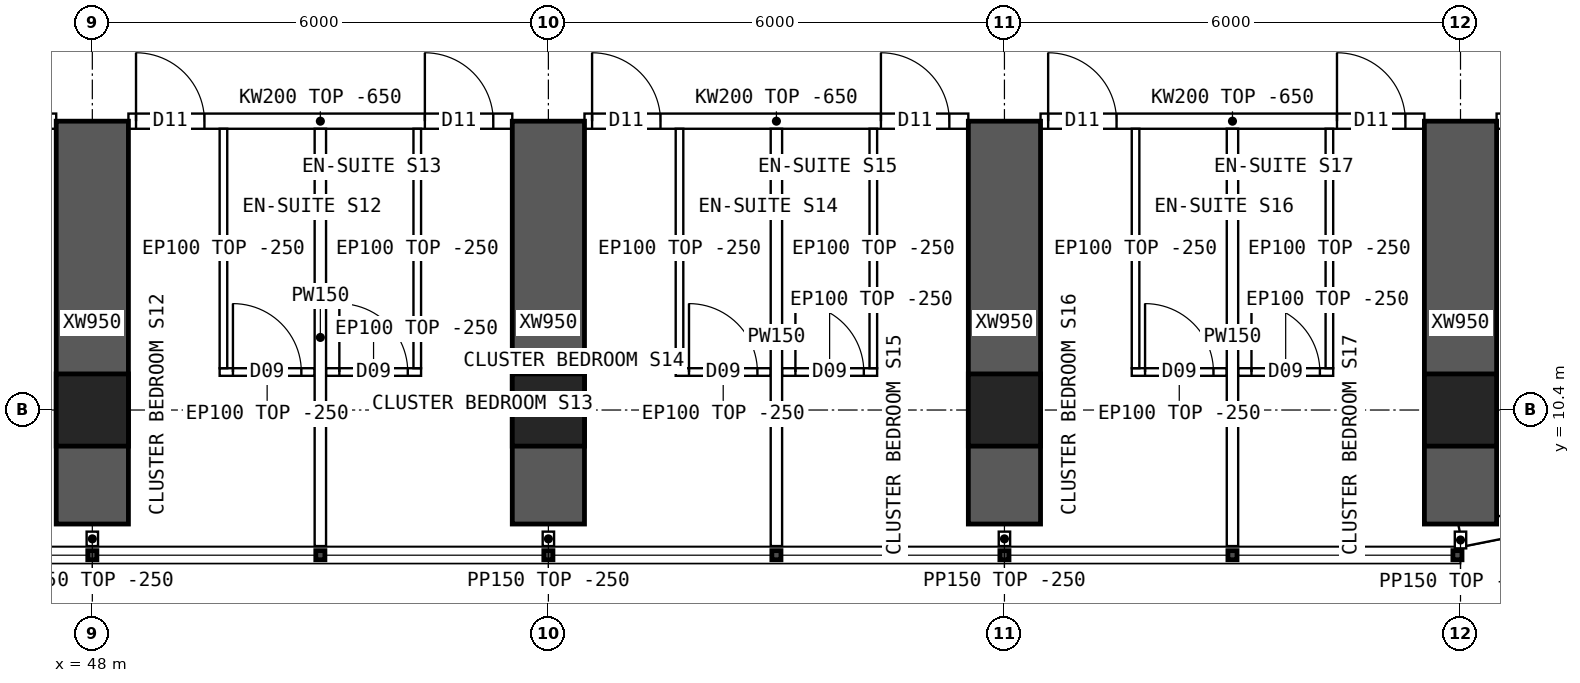
"""IFC4 building model, lengths in metres.
Left out: names, types, materials, properties, quantities, classifications, styles, units other than length and angle.
Written with IfcOpenShell. Run it as: python <this file> out.ifc"""

import sys

from ifc_helpers import new_model, si_unit, direction, frame, frame_2d, origin, origin_2d, place, context, subcontext, project, spatial, polyline, rectangle, hollow_rectangle, outline, extrude, element, fill, save


model = new_model("IFC4")
c1 = context("Model", 3, precision=1e-05, world=origin(), true_north=direction((0.0, 1.0)))
c2 = subcontext(c1, "Body", "Model", "MODEL_VIEW")
j1 = project(units=[si_unit("LENGTHUNIT", "METRE"), si_unit("PLANEANGLEUNIT", "RADIAN")], contexts=[c1])
p1 = place(None, origin())
s1 = spatial("IfcSite", under=j1, at=p1, CompositionType="ELEMENT")
p2 = place(p1, origin())
s2 = spatial("IfcBuilding", under=s1, at=p2, CompositionType="ELEMENT")
p3 = place(p2, frame((0.0, 0.0, 118.15)))
s3 = spatial("IfcBuildingStorey", under=s2, at=p3, CompositionType="ELEMENT", Elevation=118.15)
for number, where, z_axis, x_axis in (
    (1, (48.0, 10.4, 0.0), (0.0, 0.0, 1.0), (1.0, 0.0, 0.0)),
    (2, (54.0, 10.4, 0.0), (0.0, 0.0, 1.0), (1.0, 0.0, 0.0)),
    (3, (60.0, 10.4, 0.0), (0.0, 0.0, 1.0), (1.0, 0.0, 0.0)),
    (4, (66.0, 10.4, 0.0), (0.0, 0.0, 1.0), (1.0, 0.0, 0.0)),
):
    element("IfcColumn", number, at=place(p3, frame(where, z_axis=z_axis, x_axis=x_axis)), inside=s3, PredefinedType="COLUMN", context=c2, shape_type="SweptSolid", body=[
        extrude(hollow_rectangle(XDim=0.95, YDim=0.95, WallThickness=0.095, at=origin_2d()), origin(), (0.0, 0.0, 1.0), 3.75),
    ])
for number, where, z_axis, x_axis in (
    (5, (48.0, 8.9, 0.0), (0.0, 0.0, 1.0), (0.0, 1.0, 0.0)),
    (6, (54.0, 8.9, 0.0), (0.0, 0.0, 1.0), (0.0, 1.0, 0.0)),
    (7, (60.0, 8.9, 0.0), (0.0, 0.0, 1.0), (0.0, 1.0, 0.0)),
    (8, (66.0, 8.9, 0.0), (0.0, 0.0, 1.0), (0.0, 1.0, 0.0)),
):
    element("IfcWall", number, at=place(p3, frame(where, z_axis=z_axis, x_axis=x_axis)), inside=s3, PredefinedType="SHEAR", context=c2, shape_type="SweptSolid", body=[
        extrude(rectangle(XDim=5.3, YDim=0.95, at=frame_2d((2.65, 0.0))), origin(), (0.0, 0.0, 1.0), 3.75),
    ])
p4 = place(p3, frame((66.0, 8.75, 0.0), z_axis=(0.0, 0.0, 1.0), x_axis=(0.980791473772, 0.195059183267, 0.0)))
e9 = element("IfcWall", 9, at=p4, inside=s3, PredefinedType="SOLIDWALL", context=c2, shape_type="SweptSolid", body=[
    extrude(outline(polyline([(-0.03, -0.15), (3.717, -0.15), (3.657, 0.15), (0.03, 0.15), (-0.03, -0.15)])), origin(), (0.0, 0.0, 1.0), 3.5),
])
p5 = place(p4, frame((1.144, 0.0, 0.9)))
e10 = element("IfcOpeningElement", 10, at=p5, cuts=e9, PredefinedType="OPENING", context=c2, shape_type="SweptSolid", body=[
    extrude(rectangle(XDim=1.4, YDim=1.8, at=frame_2d((0.7, 0.9))), frame((0.0, 0.16, 0.0), z_axis=(0.0, -1.0, 0.0), x_axis=(1.0, 0.0, 0.0)), (0.0, 0.0, 1.0), 0.32),
])
p6 = place(p3, frame((42.475, 14.2, 0.0), z_axis=(0.0, 0.0, 1.0), x_axis=(1.0, 0.0, 0.0)))
e11 = element("IfcWall", 11, at=p6, inside=s3, PredefinedType="SOLIDWALL", context=c2, shape_type="SweptSolid", body=[
    extrude(outline(polyline([(0.0, 0.0), (5.05, 0.0), (5.05, 3.1), (0.0, 3.1), (0.0, 0.0)])), frame((0.0, 0.1, 0.0), z_axis=(0.0, -1.0, 0.0), x_axis=(1.0, 0.0, 0.0)), (0.0, 0.0, 1.0), 0.2),
])
p7 = place(p6, frame((0.6, 0.0, 0.0)))
e12 = element("IfcOpeningElement", 12, at=p7, cuts=e11, PredefinedType="OPENING", context=c2, shape_type="SweptSolid", body=[
    extrude(rectangle(XDim=1.0, YDim=2.1, at=frame_2d((0.5, 1.05))), frame((0.0, 0.11, 0.0), z_axis=(0.0, -1.0, 0.0), x_axis=(1.0, 0.0, 0.0)), (0.0, 0.0, 1.0), 0.22),
])
p8 = place(p3, frame((48.475, 14.2, 0.0), z_axis=(0.0, 0.0, 1.0), x_axis=(1.0, 0.0, 0.0)))
e13 = element("IfcWall", 13, at=p8, inside=s3, PredefinedType="SOLIDWALL", context=c2, shape_type="SweptSolid", body=[
    extrude(outline(polyline([(0.0, 0.0), (5.05, 0.0), (5.05, 3.1), (0.0, 3.1), (0.0, 0.0)])), frame((0.0, 0.1, 0.0), z_axis=(0.0, -1.0, 0.0), x_axis=(1.0, 0.0, 0.0)), (0.0, 0.0, 1.0), 0.2),
])
p9 = place(p8, frame((0.1, 0.0, 0.0)))
e14 = element("IfcOpeningElement", 14, at=p9, cuts=e13, PredefinedType="OPENING", context=c2, shape_type="SweptSolid", body=[
    extrude(rectangle(XDim=0.9, YDim=2.1, at=frame_2d((0.45, 1.05))), frame((0.0, 0.11, 0.0), z_axis=(0.0, -1.0, 0.0), x_axis=(1.0, 0.0, 0.0)), (0.0, 0.0, 1.0), 0.22),
])
p10 = place(p8, frame((3.9, 0.0, 0.0)))
e15 = element("IfcOpeningElement", 15, at=p10, cuts=e13, PredefinedType="OPENING", context=c2, shape_type="SweptSolid", body=[
    extrude(rectangle(XDim=0.9, YDim=2.1, at=frame_2d((0.45, 1.05))), frame((0.0, 0.11, 0.0), z_axis=(0.0, -1.0, 0.0), x_axis=(1.0, 0.0, 0.0)), (0.0, 0.0, 1.0), 0.22),
])
p11 = place(p3, frame((54.475, 14.2, 0.0), z_axis=(0.0, 0.0, 1.0), x_axis=(1.0, 0.0, 0.0)))
e16 = element("IfcWall", 16, at=p11, inside=s3, PredefinedType="SOLIDWALL", context=c2, shape_type="SweptSolid", body=[
    extrude(outline(polyline([(0.0, 0.0), (5.05, 0.0), (5.05, 3.1), (0.0, 3.1), (0.0, 0.0)])), frame((0.0, 0.1, 0.0), z_axis=(0.0, -1.0, 0.0), x_axis=(1.0, 0.0, 0.0)), (0.0, 0.0, 1.0), 0.2),
])
p12 = place(p11, frame((0.1, 0.0, 0.0)))
e17 = element("IfcOpeningElement", 17, at=p12, cuts=e16, PredefinedType="OPENING", context=c2, shape_type="SweptSolid", body=[
    extrude(rectangle(XDim=0.9, YDim=2.1, at=frame_2d((0.45, 1.05))), frame((0.0, 0.11, 0.0), z_axis=(0.0, -1.0, 0.0), x_axis=(1.0, 0.0, 0.0)), (0.0, 0.0, 1.0), 0.22),
])
p13 = place(p11, frame((3.9, 0.0, 0.0)))
e18 = element("IfcOpeningElement", 18, at=p13, cuts=e16, PredefinedType="OPENING", context=c2, shape_type="SweptSolid", body=[
    extrude(rectangle(XDim=0.9, YDim=2.1, at=frame_2d((0.45, 1.05))), frame((0.0, 0.11, 0.0), z_axis=(0.0, -1.0, 0.0), x_axis=(1.0, 0.0, 0.0)), (0.0, 0.0, 1.0), 0.22),
])
p14 = place(p3, frame((60.475, 14.2, 0.0), z_axis=(0.0, 0.0, 1.0), x_axis=(1.0, 0.0, 0.0)))
e19 = element("IfcWall", 19, at=p14, inside=s3, PredefinedType="SOLIDWALL", context=c2, shape_type="SweptSolid", body=[
    extrude(outline(polyline([(0.0, 0.0), (5.05, 0.0), (5.05, 3.1), (0.0, 3.1), (0.0, 0.0)])), frame((0.0, 0.1, 0.0), z_axis=(0.0, -1.0, 0.0), x_axis=(1.0, 0.0, 0.0)), (0.0, 0.0, 1.0), 0.2),
])
p15 = place(p14, frame((0.1, 0.0, 0.0)))
e20 = element("IfcOpeningElement", 20, at=p15, cuts=e19, PredefinedType="OPENING", context=c2, shape_type="SweptSolid", body=[
    extrude(rectangle(XDim=0.9, YDim=2.1, at=frame_2d((0.45, 1.05))), frame((0.0, 0.11, 0.0), z_axis=(0.0, -1.0, 0.0), x_axis=(1.0, 0.0, 0.0)), (0.0, 0.0, 1.0), 0.22),
])
p16 = place(p14, frame((3.9, 0.0, 0.0)))
e21 = element("IfcOpeningElement", 21, at=p16, cuts=e19, PredefinedType="OPENING", context=c2, shape_type="SweptSolid", body=[
    extrude(rectangle(XDim=0.9, YDim=2.1, at=frame_2d((0.45, 1.05))), frame((0.0, 0.11, 0.0), z_axis=(0.0, -1.0, 0.0), x_axis=(1.0, 0.0, 0.0)), (0.0, 0.0, 1.0), 0.22),
])
p17 = place(p3, frame((66.475, 14.2, 0.0), z_axis=(0.0, 0.0, 1.0), x_axis=(1.0, 0.0, 0.0)))
e22 = element("IfcWall", 22, at=p17, inside=s3, PredefinedType="SOLIDWALL", context=c2, shape_type="SweptSolid", body=[
    extrude(rectangle(XDim=1.925, YDim=0.2, at=frame_2d((0.962, 0.0))), origin(), (0.0, 0.0, 1.0), 3.5),
])
p18 = place(p17, frame((0.2, 0.0, 0.0)))
e23 = element("IfcOpeningElement", 23, at=p18, cuts=e22, PredefinedType="OPENING", context=c2, shape_type="SweptSolid", body=[
    extrude(rectangle(XDim=0.9, YDim=2.1, at=frame_2d((0.45, 1.05))), frame((0.0, 0.11, 0.0), z_axis=(0.0, -1.0, 0.0), x_axis=(1.0, 0.0, 0.0)), (0.0, 0.0, 1.0), 0.22),
])
p19 = place(p3, frame((51.0, 8.61, 0.0), z_axis=(0.0, 0.0, 1.0), x_axis=(0.0, 1.0, 0.0)))
e24 = element("IfcWall", 24, at=p19, inside=s3, PredefinedType="PARTITIONING", context=c2, shape_type="SweptSolid", body=[
    extrude(outline(polyline([(0.0, 0.0), (5.49, 0.0), (5.49, 3.1), (5.442, 3.1), (5.44, 3.5), (1.992, 3.5), (1.99, 3.1), (1.592, 3.1), (1.59, 3.5), (0.0, 3.5), (0.0, 0.0)])), frame((0.0, 0.075, 0.0), z_axis=(0.0, -1.0, 0.0), x_axis=(1.0, 0.0, 0.0)), (0.0, 0.0, 1.0), 0.15),
])
p20 = place(p3, frame((50.925, 10.9, 0.0), z_axis=(0.0, 0.0, 1.0), x_axis=(-1.0, 0.0, 0.0)))
e25 = element("IfcWall", 25, at=p20, inside=s3, PredefinedType="PARTITIONING", context=c2, shape_type="SweptSolid", body=[
    extrude(rectangle(XDim=1.25, YDim=0.1, at=frame_2d((0.625, 0.0))), origin(), (0.0, 0.0, 1.0), 3.5),
])
p21 = place(p20, frame((0.175, 0.0, 0.0)))
e26 = element("IfcOpeningElement", 26, at=p21, cuts=e25, PredefinedType="OPENING", context=c2, shape_type="SweptSolid", body=[
    extrude(rectangle(XDim=0.9, YDim=2.1, at=frame_2d((0.45, 1.05))), frame((0.0, 0.06, 0.0), z_axis=(0.0, -1.0, 0.0), x_axis=(1.0, 0.0, 0.0)), (0.0, 0.0, 1.0), 0.12),
])
p22 = place(p3, frame((49.725, 10.95, 0.0), z_axis=(0.0, 0.0, 1.0), x_axis=(0.0, 1.0, 0.0)))
e27 = element("IfcWall", 27, at=p22, inside=s3, PredefinedType="PARTITIONING", context=c2, shape_type="SweptSolid", body=[
    extrude(outline(polyline([(0.0, 0.0), (3.15, 0.0), (3.15, 3.1), (3.102, 3.1), (3.1, 3.5), (0.0, 3.5), (0.0, 0.0)])), frame((0.0, 0.05, 0.0), z_axis=(0.0, -1.0, 0.0), x_axis=(1.0, 0.0, 0.0)), (0.0, 0.0, 1.0), 0.1),
])
p23 = place(p3, frame((52.325, 10.9, 0.0), z_axis=(0.0, 0.0, 1.0), x_axis=(-1.0, 0.0, 0.0)))
e28 = element("IfcWall", 28, at=p23, inside=s3, PredefinedType="PARTITIONING", context=c2, shape_type="SweptSolid", body=[
    extrude(rectangle(XDim=1.25, YDim=0.1, at=frame_2d((0.625, 0.0))), origin(), (0.0, 0.0, 1.0), 3.5),
])
p24 = place(p23, frame((0.175, 0.0, 0.0)))
e29 = element("IfcOpeningElement", 29, at=p24, cuts=e28, PredefinedType="OPENING", context=c2, shape_type="SweptSolid", body=[
    extrude(rectangle(XDim=0.9, YDim=2.1, at=frame_2d((0.45, 1.05))), frame((0.0, 0.06, 0.0), z_axis=(0.0, -1.0, 0.0), x_axis=(1.0, 0.0, 0.0)), (0.0, 0.0, 1.0), 0.12),
])
p25 = place(p3, frame((52.275, 10.95, 0.0), z_axis=(0.0, 0.0, 1.0), x_axis=(0.0, 1.0, 0.0)))
e30 = element("IfcWall", 30, at=p25, inside=s3, PredefinedType="PARTITIONING", context=c2, shape_type="SweptSolid", body=[
    extrude(outline(polyline([(0.0, 0.0), (3.15, 0.0), (3.15, 3.1), (3.102, 3.1), (3.1, 3.5), (0.0, 3.5), (0.0, 0.0)])), frame((0.0, 0.05, 0.0), z_axis=(0.0, -1.0, 0.0), x_axis=(1.0, 0.0, 0.0)), (0.0, 0.0, 1.0), 0.1),
])
p26 = place(p3, frame((57.0, 8.61, 0.0), z_axis=(0.0, 0.0, 1.0), x_axis=(0.0, 1.0, 0.0)))
e31 = element("IfcWall", 31, at=p26, inside=s3, PredefinedType="PARTITIONING", context=c2, shape_type="SweptSolid", body=[
    extrude(outline(polyline([(0.0, 0.0), (5.49, 0.0), (5.49, 3.1), (5.442, 3.1), (5.44, 3.5), (1.992, 3.5), (1.99, 3.1), (1.592, 3.1), (1.59, 3.5), (0.0, 3.5), (0.0, 0.0)])), frame((0.0, 0.075, 0.0), z_axis=(0.0, -1.0, 0.0), x_axis=(1.0, 0.0, 0.0)), (0.0, 0.0, 1.0), 0.15),
])
p27 = place(p3, frame((56.925, 10.9, 0.0), z_axis=(0.0, 0.0, 1.0), x_axis=(-1.0, 0.0, 0.0)))
e32 = element("IfcWall", 32, at=p27, inside=s3, PredefinedType="PARTITIONING", context=c2, shape_type="SweptSolid", body=[
    extrude(rectangle(XDim=1.25, YDim=0.1, at=frame_2d((0.625, 0.0))), origin(), (0.0, 0.0, 1.0), 3.5),
])
p28 = place(p27, frame((0.175, 0.0, 0.0)))
e33 = element("IfcOpeningElement", 33, at=p28, cuts=e32, PredefinedType="OPENING", context=c2, shape_type="SweptSolid", body=[
    extrude(rectangle(XDim=0.9, YDim=2.1, at=frame_2d((0.45, 1.05))), frame((0.0, 0.06, 0.0), z_axis=(0.0, -1.0, 0.0), x_axis=(1.0, 0.0, 0.0)), (0.0, 0.0, 1.0), 0.12),
])
p29 = place(p3, frame((55.725, 10.95, 0.0), z_axis=(0.0, 0.0, 1.0), x_axis=(0.0, 1.0, 0.0)))
e34 = element("IfcWall", 34, at=p29, inside=s3, PredefinedType="PARTITIONING", context=c2, shape_type="SweptSolid", body=[
    extrude(outline(polyline([(0.0, 0.0), (3.15, 0.0), (3.15, 3.1), (3.102, 3.1), (3.1, 3.5), (0.0, 3.5), (0.0, 0.0)])), frame((0.0, 0.05, 0.0), z_axis=(0.0, -1.0, 0.0), x_axis=(1.0, 0.0, 0.0)), (0.0, 0.0, 1.0), 0.1),
])
p30 = place(p3, frame((58.325, 10.9, 0.0), z_axis=(0.0, 0.0, 1.0), x_axis=(-1.0, 0.0, 0.0)))
e35 = element("IfcWall", 35, at=p30, inside=s3, PredefinedType="PARTITIONING", context=c2, shape_type="SweptSolid", body=[
    extrude(rectangle(XDim=1.25, YDim=0.1, at=frame_2d((0.625, 0.0))), origin(), (0.0, 0.0, 1.0), 3.5),
])
p31 = place(p30, frame((0.175, 0.0, 0.0)))
e36 = element("IfcOpeningElement", 36, at=p31, cuts=e35, PredefinedType="OPENING", context=c2, shape_type="SweptSolid", body=[
    extrude(rectangle(XDim=0.9, YDim=2.1, at=frame_2d((0.45, 1.05))), frame((0.0, 0.06, 0.0), z_axis=(0.0, -1.0, 0.0), x_axis=(1.0, 0.0, 0.0)), (0.0, 0.0, 1.0), 0.12),
])
p32 = place(p3, frame((58.275, 10.95, 0.0), z_axis=(0.0, 0.0, 1.0), x_axis=(0.0, 1.0, 0.0)))
e37 = element("IfcWall", 37, at=p32, inside=s3, PredefinedType="PARTITIONING", context=c2, shape_type="SweptSolid", body=[
    extrude(outline(polyline([(0.0, 0.0), (3.15, 0.0), (3.15, 3.1), (3.102, 3.1), (3.1, 3.5), (0.0, 3.5), (0.0, 0.0)])), frame((0.0, 0.05, 0.0), z_axis=(0.0, -1.0, 0.0), x_axis=(1.0, 0.0, 0.0)), (0.0, 0.0, 1.0), 0.1),
])
p33 = place(p3, frame((63.0, 8.61, 0.0), z_axis=(0.0, 0.0, 1.0), x_axis=(0.0, 1.0, 0.0)))
e38 = element("IfcWall", 38, at=p33, inside=s3, PredefinedType="PARTITIONING", context=c2, shape_type="SweptSolid", body=[
    extrude(outline(polyline([(0.0, 0.0), (5.49, 0.0), (5.49, 3.1), (5.442, 3.1), (5.44, 3.5), (1.992, 3.5), (1.99, 3.1), (1.592, 3.1), (1.59, 3.5), (0.0, 3.5), (0.0, 0.0)])), frame((0.0, 0.075, 0.0), z_axis=(0.0, -1.0, 0.0), x_axis=(1.0, 0.0, 0.0)), (0.0, 0.0, 1.0), 0.15),
])
p34 = place(p3, frame((62.925, 10.9, 0.0), z_axis=(0.0, 0.0, 1.0), x_axis=(-1.0, 0.0, 0.0)))
e39 = element("IfcWall", 39, at=p34, inside=s3, PredefinedType="PARTITIONING", context=c2, shape_type="SweptSolid", body=[
    extrude(rectangle(XDim=1.25, YDim=0.1, at=frame_2d((0.625, 0.0))), origin(), (0.0, 0.0, 1.0), 3.5),
])
p35 = place(p34, frame((0.175, 0.0, 0.0)))
e40 = element("IfcOpeningElement", 40, at=p35, cuts=e39, PredefinedType="OPENING", context=c2, shape_type="SweptSolid", body=[
    extrude(rectangle(XDim=0.9, YDim=2.1, at=frame_2d((0.45, 1.05))), frame((0.0, 0.06, 0.0), z_axis=(0.0, -1.0, 0.0), x_axis=(1.0, 0.0, 0.0)), (0.0, 0.0, 1.0), 0.12),
])
p36 = place(p3, frame((61.725, 10.95, 0.0), z_axis=(0.0, 0.0, 1.0), x_axis=(0.0, 1.0, 0.0)))
e41 = element("IfcWall", 41, at=p36, inside=s3, PredefinedType="PARTITIONING", context=c2, shape_type="SweptSolid", body=[
    extrude(outline(polyline([(0.0, 0.0), (3.15, 0.0), (3.15, 3.1), (3.102, 3.1), (3.1, 3.5), (0.0, 3.5), (0.0, 0.0)])), frame((0.0, 0.05, 0.0), z_axis=(0.0, -1.0, 0.0), x_axis=(1.0, 0.0, 0.0)), (0.0, 0.0, 1.0), 0.1),
])
p37 = place(p3, frame((64.325, 10.9, 0.0), z_axis=(0.0, 0.0, 1.0), x_axis=(-1.0, 0.0, 0.0)))
e42 = element("IfcWall", 42, at=p37, inside=s3, PredefinedType="PARTITIONING", context=c2, shape_type="SweptSolid", body=[
    extrude(rectangle(XDim=1.25, YDim=0.1, at=frame_2d((0.625, 0.0))), origin(), (0.0, 0.0, 1.0), 3.5),
])
p38 = place(p37, frame((0.175, 0.0, 0.0)))
e43 = element("IfcOpeningElement", 43, at=p38, cuts=e42, PredefinedType="OPENING", context=c2, shape_type="SweptSolid", body=[
    extrude(rectangle(XDim=0.9, YDim=2.1, at=frame_2d((0.45, 1.05))), frame((0.0, 0.06, 0.0), z_axis=(0.0, -1.0, 0.0), x_axis=(1.0, 0.0, 0.0)), (0.0, 0.0, 1.0), 0.12),
])
p39 = place(p3, frame((64.275, 10.95, 0.0), z_axis=(0.0, 0.0, 1.0), x_axis=(0.0, 1.0, 0.0)))
e44 = element("IfcWall", 44, at=p39, inside=s3, PredefinedType="PARTITIONING", context=c2, shape_type="SweptSolid", body=[
    extrude(outline(polyline([(0.0, 0.0), (3.15, 0.0), (3.15, 3.1), (3.102, 3.1), (3.1, 3.5), (0.0, 3.5), (0.0, 0.0)])), frame((0.0, 0.05, 0.0), z_axis=(0.0, -1.0, 0.0), x_axis=(1.0, 0.0, 0.0)), (0.0, 0.0, 1.0), 0.1),
])
for number, where, z_axis, x_axis in (
    (45, (48.0, 8.8, 0.0), (0.0, 0.0, 1.0), (0.0, -1.0, 0.0)),
    (46, (54.0, 8.8, 0.0), (0.0, 0.0, 1.0), (0.0, -1.0, 0.0)),
    (47, (60.0, 8.8, 0.0), (0.0, 0.0, 1.0), (0.0, -1.0, 0.0)),
):
    element("IfcWall", number, at=place(p3, frame(where, z_axis=z_axis, x_axis=x_axis)), inside=s3, PredefinedType="PARTITIONING", context=c2, shape_type="SweptSolid", body=[
        extrude(rectangle(XDim=0.19, YDim=0.15, at=frame_2d((0.095, 0.0))), origin(), (0.0, 0.0, 1.0), 3.5),
    ])
p40 = place(p3, frame((66.0, 8.8, 0.0), z_axis=(0.0, 0.0, 1.0), x_axis=(0.0, -1.0, 0.0)))
e48 = element("IfcWall", 48, at=p40, inside=s3, PredefinedType="PARTITIONING", context=c2, shape_type="SweptSolid", body=[
    extrude(rectangle(XDim=0.22, YDim=0.15, at=frame_2d((0.11, 0.0))), origin(), (0.0, 0.0, 1.0), 3.5),
])
p41 = place(p21, origin())
e49 = element("IfcDoor", 49, at=p41, inside=s3, OperationType="SINGLE_SWING_RIGHT", PredefinedType="DOOR", context=c2, shape_type="SweptSolid", body=[
    extrude(rectangle(XDim=0.9, YDim=2.1, at=frame_2d((0.45, 1.05))), frame((0.0, 0.025, 0.0), z_axis=(0.0, -1.0, 0.0), x_axis=(1.0, 0.0, 0.0)), (0.0, 0.0, 1.0), 0.05),
])
fill(e26, e49)
p42 = place(p9, origin())
e50 = element("IfcDoor", 50, at=p42, inside=s3, OperationType="SINGLE_SWING_LEFT", PredefinedType="DOOR", context=c2, shape_type="SweptSolid", body=[
    extrude(rectangle(XDim=0.9, YDim=2.1, at=frame_2d((0.45, 1.05))), frame((0.0, 0.025, 0.0), z_axis=(0.0, -1.0, 0.0), x_axis=(1.0, 0.0, 0.0)), (0.0, 0.0, 1.0), 0.05),
])
fill(e14, e50)
p43 = place(p24, origin())
e51 = element("IfcDoor", 51, at=p43, inside=s3, OperationType="SINGLE_SWING_RIGHT", PredefinedType="DOOR", context=c2, shape_type="SweptSolid", body=[
    extrude(rectangle(XDim=0.9, YDim=2.1, at=frame_2d((0.45, 1.05))), frame((0.0, 0.025, 0.0), z_axis=(0.0, -1.0, 0.0), x_axis=(1.0, 0.0, 0.0)), (0.0, 0.0, 1.0), 0.05),
])
fill(e29, e51)
p44 = place(p10, origin())
e52 = element("IfcDoor", 52, at=p44, inside=s3, OperationType="SINGLE_SWING_LEFT", PredefinedType="DOOR", context=c2, shape_type="SweptSolid", body=[
    extrude(rectangle(XDim=0.9, YDim=2.1, at=frame_2d((0.45, 1.05))), frame((0.0, 0.025, 0.0), z_axis=(0.0, -1.0, 0.0), x_axis=(1.0, 0.0, 0.0)), (0.0, 0.0, 1.0), 0.05),
])
fill(e15, e52)
p45 = place(p28, origin())
e53 = element("IfcDoor", 53, at=p45, inside=s3, OperationType="SINGLE_SWING_RIGHT", PredefinedType="DOOR", context=c2, shape_type="SweptSolid", body=[
    extrude(rectangle(XDim=0.9, YDim=2.1, at=frame_2d((0.45, 1.05))), frame((0.0, 0.025, 0.0), z_axis=(0.0, -1.0, 0.0), x_axis=(1.0, 0.0, 0.0)), (0.0, 0.0, 1.0), 0.05),
])
fill(e33, e53)
p46 = place(p12, origin())
e54 = element("IfcDoor", 54, at=p46, inside=s3, OperationType="SINGLE_SWING_LEFT", PredefinedType="DOOR", context=c2, shape_type="SweptSolid", body=[
    extrude(rectangle(XDim=0.9, YDim=2.1, at=frame_2d((0.45, 1.05))), frame((0.0, 0.025, 0.0), z_axis=(0.0, -1.0, 0.0), x_axis=(1.0, 0.0, 0.0)), (0.0, 0.0, 1.0), 0.05),
])
fill(e17, e54)
p47 = place(p31, origin())
e55 = element("IfcDoor", 55, at=p47, inside=s3, OperationType="SINGLE_SWING_RIGHT", PredefinedType="DOOR", context=c2, shape_type="SweptSolid", body=[
    extrude(rectangle(XDim=0.9, YDim=2.1, at=frame_2d((0.45, 1.05))), frame((0.0, 0.025, 0.0), z_axis=(0.0, -1.0, 0.0), x_axis=(1.0, 0.0, 0.0)), (0.0, 0.0, 1.0), 0.05),
])
fill(e36, e55)
p48 = place(p13, origin())
e56 = element("IfcDoor", 56, at=p48, inside=s3, OperationType="SINGLE_SWING_LEFT", PredefinedType="DOOR", context=c2, shape_type="SweptSolid", body=[
    extrude(rectangle(XDim=0.9, YDim=2.1, at=frame_2d((0.45, 1.05))), frame((0.0, 0.025, 0.0), z_axis=(0.0, -1.0, 0.0), x_axis=(1.0, 0.0, 0.0)), (0.0, 0.0, 1.0), 0.05),
])
fill(e18, e56)
p49 = place(p35, origin())
e57 = element("IfcDoor", 57, at=p49, inside=s3, OperationType="SINGLE_SWING_RIGHT", PredefinedType="DOOR", context=c2, shape_type="SweptSolid", body=[
    extrude(rectangle(XDim=0.9, YDim=2.1, at=frame_2d((0.45, 1.05))), frame((0.0, 0.025, 0.0), z_axis=(0.0, -1.0, 0.0), x_axis=(1.0, 0.0, 0.0)), (0.0, 0.0, 1.0), 0.05),
])
fill(e40, e57)
p50 = place(p15, origin())
e58 = element("IfcDoor", 58, at=p50, inside=s3, OperationType="SINGLE_SWING_LEFT", PredefinedType="DOOR", context=c2, shape_type="SweptSolid", body=[
    extrude(rectangle(XDim=0.9, YDim=2.1, at=frame_2d((0.45, 1.05))), frame((0.0, 0.025, 0.0), z_axis=(0.0, -1.0, 0.0), x_axis=(1.0, 0.0, 0.0)), (0.0, 0.0, 1.0), 0.05),
])
fill(e20, e58)
p51 = place(p38, origin())
e59 = element("IfcDoor", 59, at=p51, inside=s3, OperationType="SINGLE_SWING_RIGHT", PredefinedType="DOOR", context=c2, shape_type="SweptSolid", body=[
    extrude(rectangle(XDim=0.9, YDim=2.1, at=frame_2d((0.45, 1.05))), frame((0.0, 0.025, 0.0), z_axis=(0.0, -1.0, 0.0), x_axis=(1.0, 0.0, 0.0)), (0.0, 0.0, 1.0), 0.05),
])
fill(e43, e59)
p52 = place(p16, origin())
e60 = element("IfcDoor", 60, at=p52, inside=s3, OperationType="SINGLE_SWING_LEFT", PredefinedType="DOOR", context=c2, shape_type="SweptSolid", body=[
    extrude(rectangle(XDim=0.9, YDim=2.1, at=frame_2d((0.45, 1.05))), frame((0.0, 0.025, 0.0), z_axis=(0.0, -1.0, 0.0), x_axis=(1.0, 0.0, 0.0)), (0.0, 0.0, 1.0), 0.05),
])
fill(e21, e60)
save(model, sys.argv[1])
